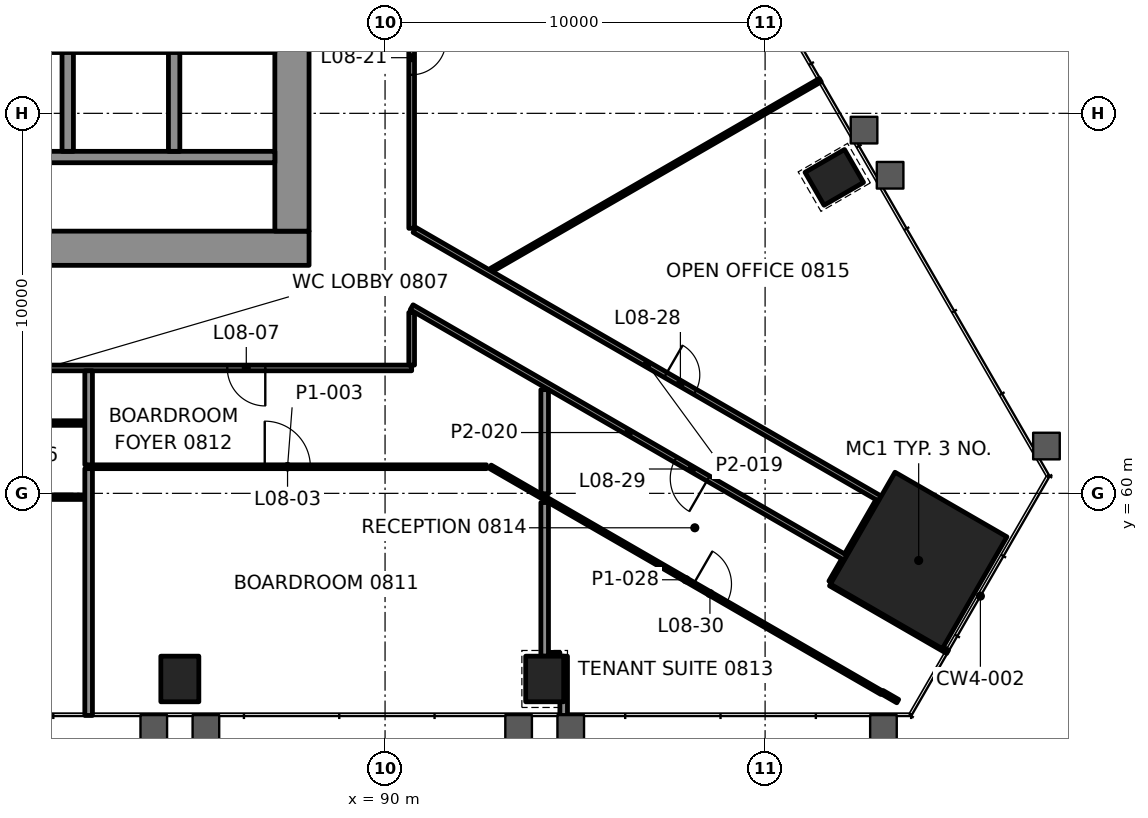
"""IFC4 building model, lengths in metres.
Left out: names, types, materials, properties, quantities, classifications, styles, units other than length and angle.
Written with IfcOpenShell. Run it as: python <this file> out.ifc"""

import sys

from ifc_helpers import new_model, si_unit, direction, frame, frame_2d, origin, origin_2d, place, context, subcontext, project, spatial, rectangle, extrude, element, fill, save


model = new_model("IFC4")
c1 = context("Model", 3, precision=1e-05, world=origin(), true_north=direction((0.0, 1.0)))
c2 = subcontext(c1, "Body", "Model", "MODEL_VIEW")
j1 = project(units=[si_unit("LENGTHUNIT", "METRE"), si_unit("PLANEANGLEUNIT", "RADIAN")], contexts=[c1])
p1 = place(None, origin())
s1 = spatial("IfcSite", under=j1, at=p1, CompositionType="ELEMENT")
p2 = place(p1, origin())
s2 = spatial("IfcBuilding", under=s1, at=p2, CompositionType="ELEMENT")
p3 = place(p2, frame((0.0, 0.0, 40.0)))
s3 = spatial("IfcBuildingStorey", under=s2, at=p3, CompositionType="ELEMENT", Elevation=40.0)
p4 = place(p3, frame((104.041, 58.233, 0.0), z_axis=(0.0, 0.0, 1.0), x_axis=(0.5, 0.866025403784, 0.0)))
e1 = element("IfcColumn", 1, at=p4, inside=s3, PredefinedType="COLUMN", context=c2, shape_type="SweptSolid", body=[
    extrude(rectangle(XDim=3.4, YDim=3.4, at=origin_2d()), origin(), (0.0, 0.0, 1.0), 4.2),
])
for number, where, z_axis, x_axis in (
    (2, (84.6, 55.115, -0.0), (0.0, 0.0, 1.0), (1.0, 0.0, 0.0)),
    (3, (94.2, 55.115, -0.0), (0.0, 0.0, 1.0), (1.0, 0.0, 0.0)),
    (4, (101.821, 68.315, -0.0), (0.0, 0.0, 1.0), (-0.5, 0.866, 0.0)),
):
    element("IfcColumn", number, at=place(p3, frame(where, z_axis=z_axis, x_axis=x_axis)), inside=s3, PredefinedType="COLUMN", context=c2, shape_type="SweptSolid", body=[
        extrude(rectangle(XDim=1.0, YDim=1.2, at=origin_2d()), origin(), (0.0, 0.0, 1.0), 4.2),
    ])
p5 = place(p3, frame((62.0, 66.45, 0.0), z_axis=(0.0, 0.0, 1.0), x_axis=(1.0, 0.0, 0.0)))
e5 = element("IfcWall", 5, at=p5, inside=s3, PredefinedType="SHEAR", context=c2, shape_type="SweptSolid", body=[
    extrude(rectangle(XDim=26.0, YDim=0.9, at=frame_2d((13.0, 0.0))), origin(), (0.0, 0.0, 1.0), 4.0),
])
p6 = place(p5, frame((3.45, 0.0, 0.0)))
e6 = element("IfcOpeningElement", 6, at=p6, cuts=e5, PredefinedType="OPENING", context=c2, shape_type="SweptSolid", body=[
    extrude(rectangle(XDim=0.9, YDim=2.1, at=frame_2d((0.45, 1.05))), frame((0.0, 0.46, 0.0), z_axis=(0.0, -1.0, 0.0), x_axis=(1.0, 0.0, 0.0)), (0.0, 0.0, 1.0), 0.92),
])
p7 = place(p5, frame((5.637, 0.0, 0.0)))
e7 = element("IfcOpeningElement", 7, at=p7, cuts=e5, PredefinedType="OPENING", context=c2, shape_type="SweptSolid", body=[
    extrude(rectangle(XDim=0.9, YDim=2.1, at=frame_2d((0.45, 1.05))), frame((0.0, 0.46, 0.0), z_axis=(0.0, -1.0, 0.0), x_axis=(1.0, 0.0, 0.0)), (0.0, 0.0, 1.0), 0.92),
])
p8 = place(p5, frame((7.212, 0.0, 0.0)))
e8 = element("IfcOpeningElement", 8, at=p8, cuts=e5, PredefinedType="OPENING", context=c2, shape_type="SweptSolid", body=[
    extrude(rectangle(XDim=0.9, YDim=2.1, at=frame_2d((0.45, 1.05))), frame((0.0, 0.46, 0.0), z_axis=(0.0, -1.0, 0.0), x_axis=(1.0, 0.0, 0.0)), (0.0, 0.0, 1.0), 0.92),
])
p9 = place(p5, frame((8.999, 0.0, 0.0)))
e9 = element("IfcOpeningElement", 9, at=p9, cuts=e5, PredefinedType="OPENING", context=c2, shape_type="SweptSolid", body=[
    extrude(rectangle(XDim=0.9, YDim=2.1, at=frame_2d((0.45, 1.05))), frame((0.0, 0.46, 0.0), z_axis=(0.0, -1.0, 0.0), x_axis=(1.0, 0.0, 0.0)), (0.0, 0.0, 1.0), 0.92),
])
p10 = place(p5, frame((17.324, 0.0, 0.0)))
e10 = element("IfcOpeningElement", 10, at=p10, cuts=e5, PredefinedType="OPENING", context=c2, shape_type="SweptSolid", body=[
    extrude(rectangle(XDim=0.9, YDim=2.1, at=frame_2d((0.45, 1.05))), frame((0.0, 0.46, 0.0), z_axis=(0.0, -1.0, 0.0), x_axis=(1.0, 0.0, 0.0)), (0.0, 0.0, 1.0), 0.92),
])
p11 = place(p3, frame((87.55, 66.9, 0.0), z_axis=(0.0, 0.0, 1.0), x_axis=(0.0, 1.0, 0.0)))
e11 = element("IfcWall", 11, at=p11, inside=s3, PredefinedType="SHEAR", context=c2, shape_type="SweptSolid", body=[
    extrude(rectangle(XDim=16.2, YDim=0.9, at=frame_2d((8.1, 0.0))), origin(), (0.0, 0.0, 1.0), 4.0),
])
p12 = place(p11, frame((5.5, 0.0, 0.0)))
e12 = element("IfcOpeningElement", 12, at=p12, cuts=e11, PredefinedType="OPENING", context=c2, shape_type="SweptSolid", body=[
    extrude(rectangle(XDim=1.8, YDim=2.1, at=frame_2d((0.9, 1.05))), frame((0.0, 0.46, 0.0), z_axis=(0.0, -1.0, 0.0), x_axis=(1.0, 0.0, 0.0)), (0.0, 0.0, 1.0), 0.92),
])
p13 = place(p11, frame((11.202, 0.0, 0.0)))
e13 = element("IfcOpeningElement", 13, at=p13, cuts=e11, PredefinedType="OPENING", context=c2, shape_type="SweptSolid", body=[
    extrude(rectangle(XDim=0.9, YDim=2.1, at=frame_2d((0.45, 1.05))), frame((0.0, 0.46, 0.0), z_axis=(0.0, -1.0, 0.0), x_axis=(1.0, 0.0, 0.0)), (0.0, 0.0, 1.0), 0.92),
])
p14 = place(p3, frame((70.35, 68.85, 0.0), z_axis=(0.0, 0.0, 1.0), x_axis=(1.0, 0.0, 0.0)))
e14 = element("IfcWall", 14, at=p14, inside=s3, PredefinedType="SHEAR", context=c2, shape_type="SweptSolid", body=[
    extrude(rectangle(XDim=16.75, YDim=0.3, at=frame_2d((8.375, 0.0))), origin(), (0.0, 0.0, 1.0), 4.0),
])
p15 = place(p3, frame((70.3, 71.75, 0.0), z_axis=(0.0, 0.0, 1.0), x_axis=(1.0, 0.0, 0.0)))
e15 = element("IfcWall", 15, at=p15, inside=s3, PredefinedType="SHEAR", context=c2, shape_type="SweptSolid", body=[
    extrude(rectangle(XDim=16.8, YDim=0.3, at=frame_2d((8.4, 0.0))), origin(), (0.0, 0.0, 1.0), 4.0),
])
p16 = place(p15, frame((1.0, 0.0, 0.0)))
e16 = element("IfcOpeningElement", 16, at=p16, cuts=e15, PredefinedType="OPENING", context=c2, shape_type="SweptSolid", body=[
    extrude(rectangle(XDim=1.1, YDim=2.1, at=frame_2d((0.55, 1.05))), frame((0.0, 0.16, 0.0), z_axis=(0.0, -1.0, 0.0), x_axis=(1.0, 0.0, 0.0)), (0.0, 0.0, 1.0), 0.32),
])
p17 = place(p15, frame((3.8, 0.0, 0.0)))
e17 = element("IfcOpeningElement", 17, at=p17, cuts=e15, PredefinedType="OPENING", context=c2, shape_type="SweptSolid", body=[
    extrude(rectangle(XDim=1.1, YDim=2.1, at=frame_2d((0.55, 1.05))), frame((0.0, 0.16, 0.0), z_axis=(0.0, -1.0, 0.0), x_axis=(1.0, 0.0, 0.0)), (0.0, 0.0, 1.0), 0.32),
])
p18 = place(p15, frame((6.6, 0.0, 0.0)))
e18 = element("IfcOpeningElement", 18, at=p18, cuts=e15, PredefinedType="OPENING", context=c2, shape_type="SweptSolid", body=[
    extrude(rectangle(XDim=1.1, YDim=2.1, at=frame_2d((0.55, 1.05))), frame((0.0, 0.16, 0.0), z_axis=(0.0, -1.0, 0.0), x_axis=(1.0, 0.0, 0.0)), (0.0, 0.0, 1.0), 0.32),
])
p19 = place(p15, frame((9.4, 0.0, 0.0)))
e19 = element("IfcOpeningElement", 19, at=p19, cuts=e15, PredefinedType="OPENING", context=c2, shape_type="SweptSolid", body=[
    extrude(rectangle(XDim=1.1, YDim=2.1, at=frame_2d((0.55, 1.05))), frame((0.0, 0.16, 0.0), z_axis=(0.0, -1.0, 0.0), x_axis=(1.0, 0.0, 0.0)), (0.0, 0.0, 1.0), 0.32),
])
p20 = place(p15, frame((12.2, 0.0, 0.0)))
e20 = element("IfcOpeningElement", 20, at=p20, cuts=e15, PredefinedType="OPENING", context=c2, shape_type="SweptSolid", body=[
    extrude(rectangle(XDim=1.1, YDim=2.1, at=frame_2d((0.55, 1.05))), frame((0.0, 0.16, 0.0), z_axis=(0.0, -1.0, 0.0), x_axis=(1.0, 0.0, 0.0)), (0.0, 0.0, 1.0), 0.32),
])
p21 = place(p15, frame((14.925, 0.0, 0.0)))
e21 = element("IfcOpeningElement", 21, at=p21, cuts=e15, PredefinedType="OPENING", context=c2, shape_type="SweptSolid", body=[
    extrude(rectangle(XDim=1.1, YDim=2.1, at=frame_2d((0.55, 1.05))), frame((0.0, 0.16, 0.0), z_axis=(0.0, -1.0, 0.0), x_axis=(1.0, 0.0, 0.0)), (0.0, 0.0, 1.0), 0.32),
])
for number, where, z_axis, x_axis in (
    (22, (81.65, 69.0, 0.0), (0.0, 0.0, 1.0), (0.0, 1.0, 0.0)),
    (23, (84.45, 69.0, 0.0), (0.0, 0.0, 1.0), (0.0, 1.0, 0.0)),
):
    element("IfcWall", number, at=place(p3, frame(where, z_axis=z_axis, x_axis=x_axis)), inside=s3, PredefinedType="SHEAR", context=c2, shape_type="SweptSolid", body=[
        extrude(rectangle(XDim=2.6, YDim=0.3, at=frame_2d((1.3, 0.0))), origin(), (0.0, 0.0, 1.0), 4.0),
    ])
p22 = place(p3, frame((94.3, 55.715, 0.0), z_axis=(0.0, 0.0, 1.0), x_axis=(1.0, 0.0, 0.0)))
e24 = element("IfcWall", 24, at=p22, inside=s3, PredefinedType="PARTITIONING", context=c2, shape_type="SweptSolid", body=[
    extrude(rectangle(XDim=0.3, YDim=0.2, at=frame_2d((0.15, 0.0))), origin(), (0.0, 0.0, 1.0), 3.4),
])
p23 = place(p3, frame((75.0, 59.9, 0.0), z_axis=(0.0, 0.0, 1.0), x_axis=(1.0, 0.0, 0.0)))
e25 = element("IfcWall", 25, at=p23, inside=s3, PredefinedType="PARTITIONING", context=c2, shape_type="SweptSolid", body=[
    extrude(rectangle(XDim=7.1, YDim=0.12, at=frame_2d((3.55, 0.0))), origin(), (0.0, 0.0, 1.0), 3.4),
])
p24 = place(p3, frame((82.2, 60.7, 0.0), z_axis=(0.0, 0.0, 1.0), x_axis=(1.0, 0.0, 0.0)))
e26 = element("IfcWall", 26, at=p24, inside=s3, PredefinedType="PARTITIONING", context=c2, shape_type="SweptSolid", body=[
    extrude(rectangle(XDim=10.468, YDim=0.1, at=frame_2d((5.234, 0.0))), origin(), (0.0, 0.0, 1.0), 3.4),
])
p25 = place(p24, frame((4.634, 0.0, 0.0)))
e27 = element("IfcOpeningElement", 27, at=p25, cuts=e26, PredefinedType="OPENING", context=c2, shape_type="SweptSolid", body=[
    extrude(rectangle(XDim=1.2, YDim=2.1, at=frame_2d((0.6, 1.05))), frame((0.0, 0.06, 0.0), z_axis=(0.0, -1.0, 0.0), x_axis=(1.0, 0.0, 0.0)), (0.0, 0.0, 1.0), 0.12),
])
p26 = place(p3, frame((75.0, 61.85, 0.0), z_axis=(0.0, 0.0, 1.0), x_axis=(1.0, 0.0, 0.0)))
e28 = element("IfcWall", 28, at=p26, inside=s3, PredefinedType="PARTITIONING", context=c2, shape_type="SweptSolid", body=[
    extrude(rectangle(XDim=7.1, YDim=0.12, at=frame_2d((3.55, 0.0))), origin(), (0.0, 0.0, 1.0), 3.4),
])
p27 = place(p26, frame((0.68, 0.0, 0.0)))
e29 = element("IfcOpeningElement", 29, at=p27, cuts=e28, PredefinedType="OPENING", context=c2, shape_type="SweptSolid", body=[
    extrude(rectangle(XDim=0.9, YDim=2.1, at=frame_2d((0.45, 1.05))), frame((0.0, 0.07, 0.0), z_axis=(0.0, -1.0, 0.0), x_axis=(1.0, 0.0, 0.0)), (0.0, 0.0, 1.0), 0.14),
])
p28 = place(p26, frame((2.636, 0.0, 0.0)))
e30 = element("IfcOpeningElement", 30, at=p28, cuts=e28, PredefinedType="OPENING", context=c2, shape_type="SweptSolid", body=[
    extrude(rectangle(XDim=0.9, YDim=2.1, at=frame_2d((0.45, 1.05))), frame((0.0, 0.07, 0.0), z_axis=(0.0, -1.0, 0.0), x_axis=(1.0, 0.0, 0.0)), (0.0, 0.0, 1.0), 0.14),
])
p29 = place(p26, frame((5.006, 0.0, 0.0)))
e31 = element("IfcOpeningElement", 31, at=p29, cuts=e28, PredefinedType="OPENING", context=c2, shape_type="SweptSolid", body=[
    extrude(rectangle(XDim=1.0, YDim=2.1, at=frame_2d((0.5, 1.05))), frame((0.0, 0.07, 0.0), z_axis=(0.0, -1.0, 0.0), x_axis=(1.0, 0.0, 0.0)), (0.0, 0.0, 1.0), 0.14),
])
p30 = place(p3, frame((90.7, 63.3, 0.0), z_axis=(0.0, 0.0, 1.0), x_axis=(-1.0, 0.0, 0.0)))
e32 = element("IfcWall", 32, at=p30, inside=s3, PredefinedType="PARTITIONING", context=c2, shape_type="SweptSolid", body=[
    extrude(rectangle(XDim=31.4, YDim=0.15, at=frame_2d((15.7, 0.0))), origin(), (0.0, 0.0, 1.0), 3.4),
])
p31 = place(p30, frame((3.852, 0.0, 0.0)))
e33 = element("IfcOpeningElement", 33, at=p31, cuts=e32, PredefinedType="OPENING", context=c2, shape_type="SweptSolid", body=[
    extrude(rectangle(XDim=1.0, YDim=2.1, at=frame_2d((0.5, 1.05))), frame((0.0, 0.085, 0.0), z_axis=(0.0, -1.0, 0.0), x_axis=(1.0, 0.0, 0.0)), (0.0, 0.0, 1.0), 0.17),
])
p32 = place(p30, frame((11.5, 0.0, 0.0)))
e34 = element("IfcOpeningElement", 34, at=p32, cuts=e32, PredefinedType="OPENING", context=c2, shape_type="SweptSolid", body=[
    extrude(rectangle(XDim=1.2, YDim=2.1, at=frame_2d((0.6, 1.05))), frame((0.0, 0.085, 0.0), z_axis=(0.0, -1.0, 0.0), x_axis=(1.0, 0.0, 0.0)), (0.0, 0.0, 1.0), 0.17),
])
p33 = place(p30, frame((20.05, 0.0, 0.0)))
e35 = element("IfcOpeningElement", 35, at=p33, cuts=e32, PredefinedType="OPENING", context=c2, shape_type="SweptSolid", body=[
    extrude(rectangle(XDim=0.9, YDim=2.1, at=frame_2d((0.45, 1.05))), frame((0.0, 0.085, 0.0), z_axis=(0.0, -1.0, 0.0), x_axis=(1.0, 0.0, 0.0)), (0.0, 0.0, 1.0), 0.17),
])
p34 = place(p30, frame((27.749, 0.0, 0.0)))
e36 = element("IfcOpeningElement", 36, at=p34, cuts=e32, PredefinedType="OPENING", context=c2, shape_type="SweptSolid", body=[
    extrude(rectangle(XDim=1.0, YDim=2.1, at=frame_2d((0.5, 1.05))), frame((0.0, 0.085, 0.0), z_axis=(0.0, -1.0, 0.0), x_axis=(1.0, 0.0, 0.0)), (0.0, 0.0, 1.0), 0.17),
])
p35 = place(p3, frame((92.801, 65.878, 0.0), z_axis=(0.0, 0.0, 1.0), x_axis=(0.86602359872, 0.50000312645, 0.0)))
e37 = element("IfcWall", 37, at=p35, inside=s3, PredefinedType="PARTITIONING", context=c2, shape_type="SweptSolid", body=[
    extrude(rectangle(XDim=9.989, YDim=0.1, at=frame_2d((4.995, 0.0))), origin(), (0.0, 0.0, 1.0), 3.165),
])
p36 = place(p3, frame((101.744, 57.655, 0.0), z_axis=(0.0, 0.0, 1.0), x_axis=(0.500108776725, 0.865962592404, 0.0)))
e38 = element("IfcWall", 38, at=p36, inside=s3, PredefinedType="PARTITIONING", context=c2, shape_type="SweptSolid", body=[
    extrude(rectangle(XDim=0.675, YDim=0.15, at=frame_2d((0.337, 0.0))), origin(), (0.0, 0.0, 1.0), 3.4),
])
p37 = place(p3, frame((94.7, 54.155, 0.0), z_axis=(0.0, 0.0, 1.0), x_axis=(0.0, 1.0, 0.0)))
e39 = element("IfcWall", 39, at=p37, inside=s3, PredefinedType="PARTITIONING", context=c2, shape_type="SweptSolid", body=[
    extrude(rectangle(XDim=1.56, YDim=0.2, at=frame_2d((0.78, 0.0))), origin(), (0.0, 0.0, 1.0), 3.4),
])
p38 = place(p3, frame((94.2, 55.715, 0.0), z_axis=(0.0, 0.0, 1.0), x_axis=(0.0, 1.0, 0.0)))
e40 = element("IfcWall", 40, at=p38, inside=s3, PredefinedType="PARTITIONING", context=c2, shape_type="SweptSolid", body=[
    extrude(rectangle(XDim=4.043, YDim=0.2, at=frame_2d((2.021, 0.0))), origin(), (0.0, 0.0, 1.0), 3.4),
])
p39 = place(p3, frame((90.7, 63.375, 0.0), z_axis=(0.0, 0.0, 1.0), x_axis=(0.0, 1.0, 0.0)))
e41 = element("IfcWall", 41, at=p39, inside=s3, PredefinedType="PARTITIONING", context=c2, shape_type="SweptSolid", body=[
    extrude(rectangle(XDim=1.385, YDim=0.15, at=frame_2d((0.692, 0.0))), origin(), (0.0, 0.0, 1.0), 3.247),
])
p40 = place(p3, frame((90.7, 86.699, 0.0), z_axis=(0.0, 0.0, 1.0), x_axis=(0.0, -1.0, 0.0)))
e42 = element("IfcWall", 42, at=p40, inside=s3, PredefinedType="PARTITIONING", context=c2, shape_type="SweptSolid", body=[
    extrude(rectangle(XDim=19.725, YDim=0.15, at=frame_2d((9.862, 0.0))), origin(), (0.0, 0.0, 1.0), 3.4),
])
p41 = place(p40, frame((14.785, 0.0, 0.0)))
e43 = element("IfcOpeningElement", 43, at=p41, cuts=e42, PredefinedType="OPENING", context=c2, shape_type="SweptSolid", body=[
    extrude(rectangle(XDim=0.9, YDim=2.1, at=frame_2d((0.45, 1.05))), frame((0.0, 0.085, 0.0), z_axis=(0.0, -1.0, 0.0), x_axis=(1.0, 0.0, 0.0)), (0.0, 0.0, 1.0), 0.17),
])
p42 = place(p3, frame((82.2, 54.155, 0.0), z_axis=(0.0, 0.0, 1.0), x_axis=(0.0, 1.0, 0.0)))
e44 = element("IfcWall", 44, at=p42, inside=s3, PredefinedType="PARTITIONING", context=c2, shape_type="SweptSolid", body=[
    extrude(rectangle(XDim=6.495, YDim=0.2, at=frame_2d((3.247, 0.0))), origin(), (0.0, 0.0, 1.0), 3.165),
])
p43 = place(p3, frame((90.775, 66.932, 0.0), z_axis=(0.0, 0.0, 1.0), x_axis=(0.86602195393, -0.500005975275, 0.0)))
e45 = element("IfcWall", 45, at=p43, inside=s3, PredefinedType="PARTITIONING", context=c2, shape_type="SweptSolid", body=[
    extrude(rectangle(XDim=14.137, YDim=0.15, at=frame_2d((7.069, 0.0))), origin(), (0.0, 0.0, 1.0), 3.4),
])
p44 = place(p43, frame((7.629, 0.0, 0.0)))
e46 = element("IfcOpeningElement", 46, at=p44, cuts=e45, PredefinedType="OPENING", context=c2, shape_type="SweptSolid", body=[
    extrude(rectangle(XDim=0.9, YDim=2.1, at=frame_2d((0.45, 1.05))), frame((0.0, 0.085, 0.0), z_axis=(0.0, -1.0, 0.0), x_axis=(1.0, 0.0, 0.0)), (0.0, 0.0, 1.0), 0.17),
])
p45 = place(p3, frame((102.118, 58.304, 0.0), z_axis=(0.0, 0.0, 1.0), x_axis=(-0.866022774611, 0.500004553834, 0.0)))
e47 = element("IfcWall", 47, at=p45, inside=s3, PredefinedType="PARTITIONING", context=c2, shape_type="SweptSolid", body=[
    extrude(rectangle(XDim=13.185, YDim=0.15, at=frame_2d((6.593, 0.0))), origin(), (0.0, 0.0, 1.0), 3.247),
])
p46 = place(p45, frame((4.173, 0.0, 0.0)))
e48 = element("IfcOpeningElement", 48, at=p46, cuts=e47, PredefinedType="OPENING", context=c2, shape_type="SweptSolid", body=[
    extrude(rectangle(XDim=1.0, YDim=2.1, at=frame_2d((0.5, 1.05))), frame((0.0, 0.085, 0.0), z_axis=(0.0, -1.0, 0.0), x_axis=(1.0, 0.0, 0.0)), (0.0, 0.0, 1.0), 0.17),
])
p47 = place(p3, frame((104.802, 55.831, 0.0), z_axis=(0.0, 0.0, 1.0), x_axis=(-0.866014251095, 0.500019316528, 0.0)))
e49 = element("IfcWall", 49, at=p47, inside=s3, PredefinedType="PARTITIONING", context=c2, shape_type="SweptSolid", body=[
    extrude(rectangle(XDim=3.559, YDim=0.1, at=frame_2d((1.78, 0.0))), origin(), (0.0, 0.0, 1.0), 3.4),
])
p48 = place(p3, frame((103.49, 54.532, 0.0), z_axis=(0.0, 0.0, 1.0), x_axis=(-0.866073792734, 0.499916178513, 0.0)))
e50 = element("IfcWall", 50, at=p48, inside=s3, PredefinedType="PARTITIONING", context=c2, shape_type="SweptSolid", body=[
    extrude(rectangle(XDim=0.473, YDim=0.1, at=frame_2d((0.236, 0.0))), origin(), (0.0, 0.0, 1.0), 3.4),
])
p49 = place(p3, frame((92.768, 60.7, 0.0), z_axis=(0.0, 0.0, 1.0), x_axis=(0.866025640697, -0.499999589656, 0.0)))
e51 = element("IfcWall", 51, at=p49, inside=s3, PredefinedType="PARTITIONING", context=c2, shape_type="SweptSolid", body=[
    extrude(rectangle(XDim=11.896, YDim=0.1, at=frame_2d((5.948, 0.0))), origin(), (0.0, 0.0, 1.0), 3.4),
])
p50 = place(p49, frame((6.175, 0.0, 0.0)))
e52 = element("IfcOpeningElement", 52, at=p50, cuts=e51, PredefinedType="OPENING", context=c2, shape_type="SweptSolid", body=[
    extrude(rectangle(XDim=1.0, YDim=2.1, at=frame_2d((0.5, 1.05))), frame((0.0, 0.06, 0.0), z_axis=(0.0, -1.0, 0.0), x_axis=(1.0, 0.0, 0.0)), (0.0, 0.0, 1.0), 0.12),
])
p51 = place(p3, frame((82.2, 60.75, 0.0), z_axis=(0.0, 0.0, 1.0), x_axis=(0.0, 1.0, 0.0)))
e53 = element("IfcWall", 53, at=p51, inside=s3, PredefinedType="PARTITIONING", context=c2, shape_type="SweptSolid", body=[
    extrude(rectangle(XDim=2.475, YDim=0.2, at=frame_2d((1.238, 0.0))), origin(), (0.0, 0.0, 1.0), 3.4),
])
p52 = place(p3, frame((102.157, 58.369, 0.0), z_axis=(0.0, 0.0, 1.0), x_axis=(0.500055614084, 0.865993292597, 0.0)))
e54 = element("IfcWall", 54, at=p52, inside=s3, PredefinedType="PARTITIONING", context=c2, shape_type="SweptSolid", body=[
    extrude(rectangle(XDim=1.649, YDim=0.15, at=frame_2d((0.825, 0.0))), origin(), (0.0, 0.0, 1.0), 3.247),
])
p53 = place(p3, frame((94.2, 59.989, 0.0), z_axis=(0.0, 0.0, 1.0), x_axis=(0.0, 1.0, 0.0)))
e55 = element("IfcWall", 55, at=p53, inside=s3, PredefinedType="PARTITIONING", context=c2, shape_type="SweptSolid", body=[
    extrude(rectangle(XDim=2.74, YDim=0.2, at=frame_2d((1.37, 0.0))), origin(), (0.0, 0.0, 1.0), 3.4),
])
p54 = place(p25, origin())
e56 = element("IfcDoor", 56, at=p54, inside=s3, OperationType="DOUBLE_DOOR_SINGLE_SWING", PredefinedType="DOOR", context=c2, shape_type="SweptSolid", body=[
    extrude(rectangle(XDim=1.2, YDim=2.1, at=frame_2d((0.6, 1.05))), frame((0.0, 0.025, 0.0), z_axis=(0.0, -1.0, 0.0), x_axis=(1.0, 0.0, 0.0)), (0.0, 0.0, 1.0), 0.05),
])
fill(e27, e56)
p55 = place(p31, origin())
e57 = element("IfcDoor", 57, at=p55, inside=s3, OperationType="SINGLE_SWING_RIGHT", PredefinedType="DOOR", context=c2, shape_type="SweptSolid", body=[
    extrude(rectangle(XDim=1.0, YDim=2.1, at=frame_2d((0.5, 1.05))), frame((0.0, 0.025, 0.0), z_axis=(0.0, -1.0, 0.0), x_axis=(1.0, 0.0, 0.0)), (0.0, 0.0, 1.0), 0.05),
])
fill(e33, e57)
p56 = place(p41, origin())
e58 = element("IfcDoor", 58, at=p56, inside=s3, OperationType="SINGLE_SWING_RIGHT", PredefinedType="DOOR", context=c2, shape_type="SweptSolid", body=[
    extrude(rectangle(XDim=0.9, YDim=2.1, at=frame_2d((0.45, 1.05))), frame((0.0, 0.025, 0.0), z_axis=(0.0, -1.0, 0.0), x_axis=(1.0, 0.0, 0.0)), (0.0, 0.0, 1.0), 0.05),
])
fill(e43, e58)
p57 = place(p44, origin())
e59 = element("IfcDoor", 59, at=p57, inside=s3, OperationType="SINGLE_SWING_LEFT", PredefinedType="DOOR", context=c2, shape_type="SweptSolid", body=[
    extrude(rectangle(XDim=0.9, YDim=2.1, at=frame_2d((0.45, 1.05))), frame((0.0, 0.025, 0.0), z_axis=(0.0, -1.0, 0.0), x_axis=(1.0, 0.0, 0.0)), (0.0, 0.0, 1.0), 0.05),
])
fill(e46, e59)
p58 = place(p46, origin())
e60 = element("IfcDoor", 60, at=p58, inside=s3, OperationType="SINGLE_SWING_LEFT", PredefinedType="DOOR", context=c2, shape_type="SweptSolid", body=[
    extrude(rectangle(XDim=1.0, YDim=2.1, at=frame_2d((0.5, 1.05))), frame((0.0, 0.025, 0.0), z_axis=(0.0, -1.0, 0.0), x_axis=(1.0, 0.0, 0.0)), (0.0, 0.0, 1.0), 0.05),
])
fill(e48, e60)
p59 = place(p50, origin())
e61 = element("IfcDoor", 61, at=p59, inside=s3, OperationType="SINGLE_SWING_LEFT", PredefinedType="DOOR", context=c2, shape_type="SweptSolid", body=[
    extrude(rectangle(XDim=1.0, YDim=2.1, at=frame_2d((0.5, 1.05))), frame((0.0, 0.025, 0.0), z_axis=(0.0, -1.0, 0.0), x_axis=(1.0, 0.0, 0.0)), (0.0, 0.0, 1.0), 0.05),
])
fill(e52, e61)
save(model, sys.argv[1])
